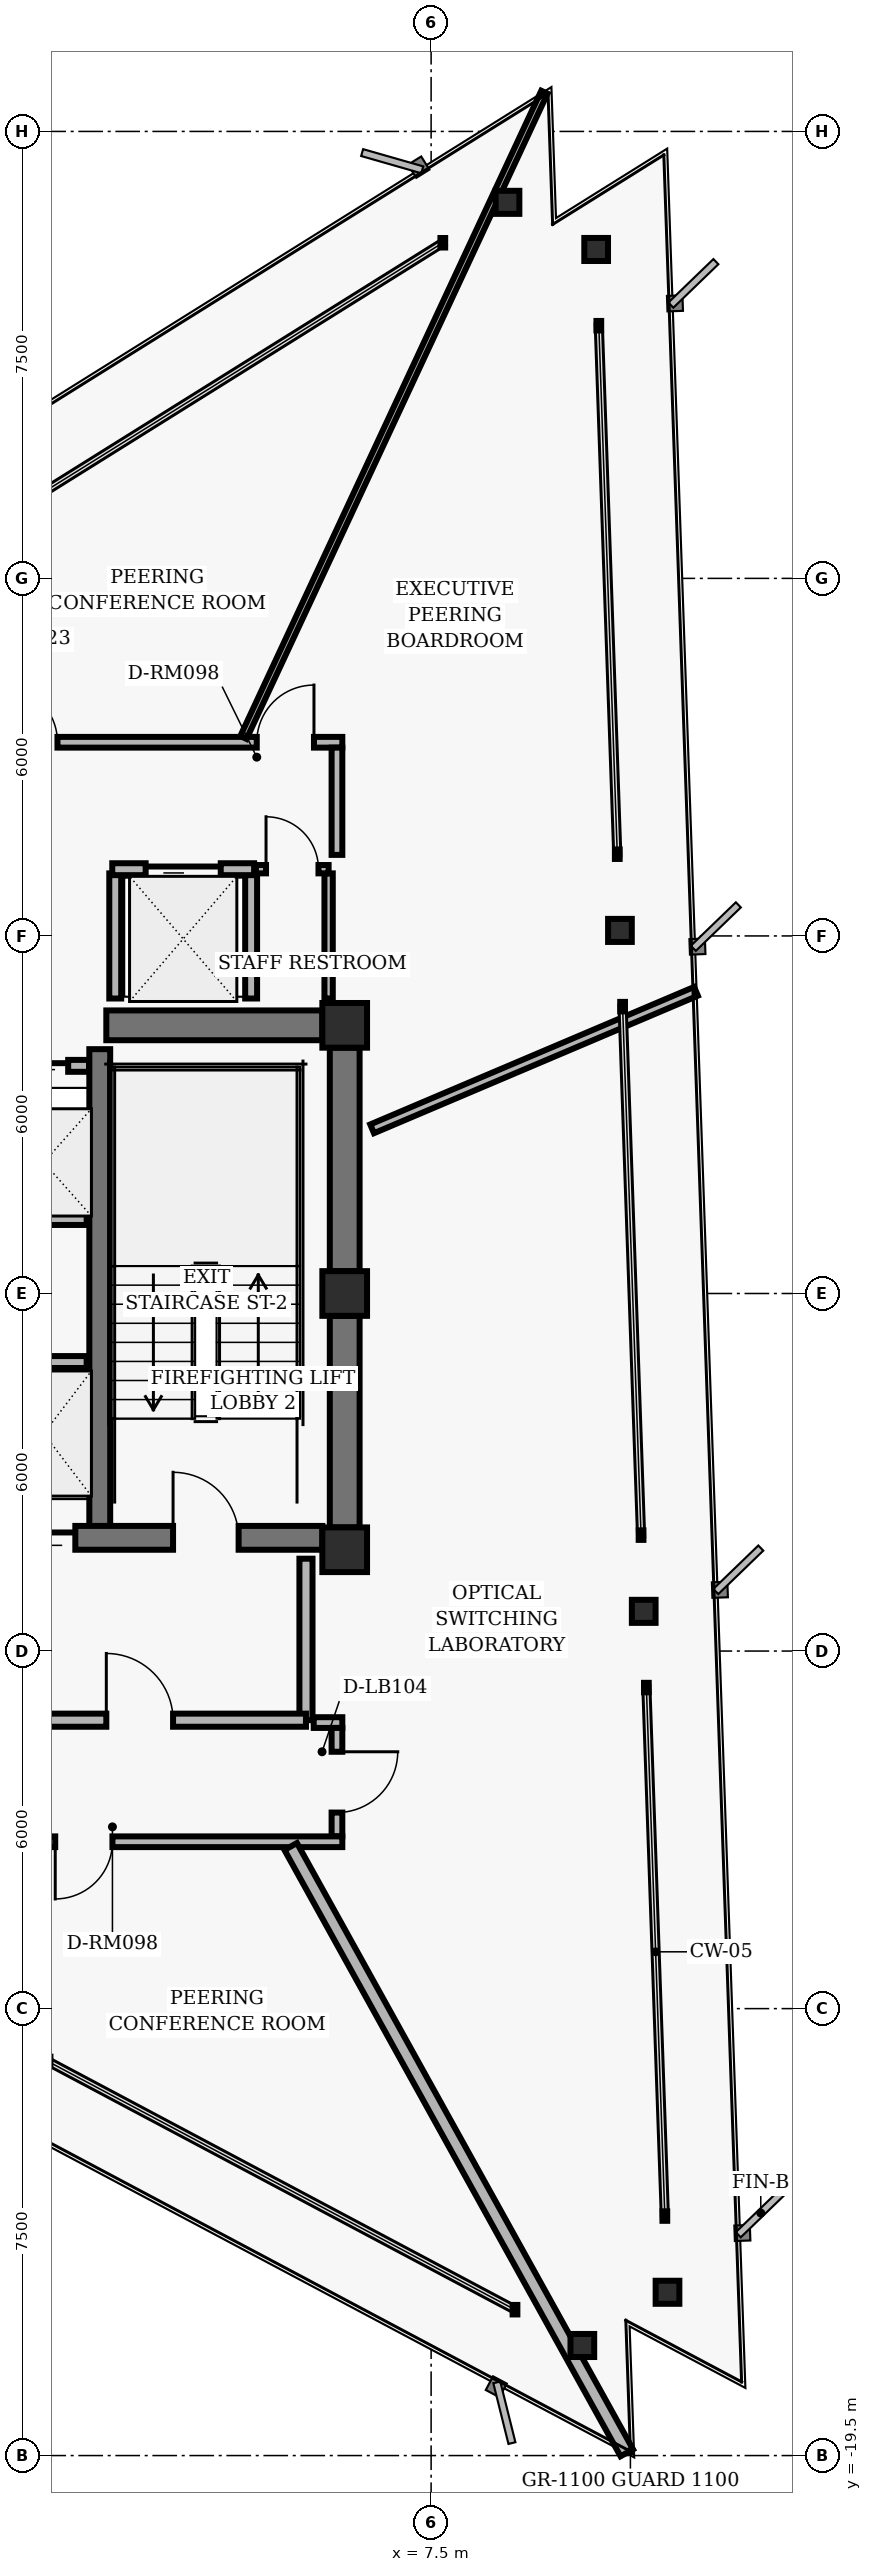
"""IFC4 building model, lengths in metres.
Left out: names, types, materials, properties, quantities, classifications, styles, units other than length and angle.
Written with IfcOpenShell. Run it as: python <this file> out.ifc"""

import sys

from ifc_helpers import new_model, si_unit, direction, frame, frame_2d, origin, origin_2d, place, context, subcontext, project, spatial, rectangle, hollow_rectangle, i_section, extrude, element, fill, save


model = new_model("IFC4")
c1 = context("Model", 3, precision=1e-05, world=origin(), true_north=direction((0.0, 1.0)))
c2 = subcontext(c1, "Body", "Model", "MODEL_VIEW")
j1 = project(units=[si_unit("LENGTHUNIT", "METRE"), si_unit("PLANEANGLEUNIT", "RADIAN")], contexts=[c1])
p1 = place(None, origin())
s1 = spatial("IfcSite", under=j1, at=p1, CompositionType="ELEMENT")
p2 = place(p1, origin())
s2 = spatial("IfcBuilding", under=s1, at=p2, CompositionType="ELEMENT")
p3 = place(p2, frame((0.0, 0.0, 193.6)))
s3 = spatial("IfcBuildingStorey", under=s2, at=p3, CompositionType="ELEMENT", Elevation=193.6)
for number, where, z_axis, x_axis in (
    (1, (6.05, 4.5, 0.0), (0.0, 0.0, 1.0), (1.0, 0.0, 0.0)),
    (2, (6.05, 0.0, 0.0), (0.0, 0.0, 1.0), (1.0, 0.0, 0.0)),
    (3, (6.05, -4.3, 0.0), (0.0, 0.0, 1.0), (1.0, 0.0, 0.0)),
):
    element("IfcColumn", number, at=place(p3, frame(where, z_axis=z_axis, x_axis=x_axis)), inside=s3, PredefinedType="COLUMN", context=c2, shape_type="SweptSolid", body=[
        extrude(hollow_rectangle(XDim=0.75, YDim=0.75, WallThickness=0.05, InnerFilletRadius=0.02, OuterFilletRadius=0.04, at=origin_2d()), origin(), (0.0, 0.0, 1.0), 3.04),
    ])
p4 = place(p3, frame((6.05, 0.375, 0.0), z_axis=(0.0, 0.0, 1.0), x_axis=(0.0, 1.0, 0.0)))
e4 = element("IfcWall", 4, at=p4, inside=s3, PredefinedType="SHEAR", context=c2, shape_type="SweptSolid", body=[
    extrude(rectangle(XDim=3.75, YDim=0.5, at=frame_2d((1.875, 0.0))), origin(), (0.0, 0.0, 1.0), 2.798),
])
p5 = place(p3, frame((6.05, -3.925, 0.0), z_axis=(0.0, 0.0, 1.0), x_axis=(0.0, 1.0, 0.0)))
e5 = element("IfcWall", 5, at=p5, inside=s3, PredefinedType="SHEAR", context=c2, shape_type="SweptSolid", body=[
    extrude(rectangle(XDim=3.55, YDim=0.5, at=frame_2d((1.775, 0.0))), origin(), (0.0, 0.0, 1.0), 2.798),
])
p6 = place(p3, frame((1.94, -4.1, 0.0), z_axis=(0.0, 0.0, 1.0), x_axis=(0.0, 1.0, 0.0)))
e6 = element("IfcWall", 6, at=p6, inside=s3, PredefinedType="SHEAR", context=c2, shape_type="SweptSolid", body=[
    extrude(rectangle(XDim=8.2, YDim=0.35, at=frame_2d((4.1, 0.0))), origin(), (0.0, 0.0, 1.0), 2.798),
])
p7 = place(p3, frame((-5.675, -4.1, 0.0), z_axis=(0.0, 0.0, 1.0), x_axis=(1.0, 0.0, 0.0)))
e7 = element("IfcWall", 7, at=p7, inside=s3, PredefinedType="SHEAR", context=c2, shape_type="SweptSolid", body=[
    extrude(rectangle(XDim=11.35, YDim=0.4, at=frame_2d((5.675, 0.0))), origin(), (0.0, 0.0, 1.0), 2.798),
])
p8 = place(p7, frame((1.405, 0.0, 0.0)))
e8 = element("IfcOpeningElement", 8, at=p8, cuts=e7, PredefinedType="OPENING", context=c2, shape_type="SweptSolid", body=[
    extrude(rectangle(XDim=1.1, YDim=2.04, at=frame_2d((0.55, 1.02))), frame((0.0, 0.21, 0.0), z_axis=(0.0, -1.0, 0.0), x_axis=(1.0, 0.0, 0.0)), (0.0, 0.0, 1.0), 0.42),
])
p9 = place(p7, frame((8.845, 0.0, 0.0)))
e9 = element("IfcOpeningElement", 9, at=p9, cuts=e7, PredefinedType="OPENING", context=c2, shape_type="SweptSolid", body=[
    extrude(rectangle(XDim=1.1, YDim=2.04, at=frame_2d((0.55, 1.02))), frame((0.0, 0.21, 0.0), z_axis=(0.0, -1.0, 0.0), x_axis=(1.0, 0.0, 0.0)), (0.0, 0.0, 1.0), 0.42),
])
p10 = place(p7, frame((4.145, 0.0, 0.0)))
e10 = element("IfcOpeningElement", 10, at=p10, cuts=e7, PredefinedType="OPENING", context=c2, shape_type="SweptSolid", body=[
    extrude(rectangle(XDim=1.06, YDim=2.04, at=frame_2d((0.53, 1.02))), frame((0.0, 0.21, 0.0), z_axis=(0.0, -1.0, 0.0), x_axis=(1.0, 0.0, 0.0)), (0.0, 0.0, 1.0), 0.42),
])
p11 = place(p7, frame((6.145, 0.0, 0.0)))
e11 = element("IfcOpeningElement", 11, at=p11, cuts=e7, PredefinedType="OPENING", context=c2, shape_type="SweptSolid", body=[
    extrude(rectangle(XDim=1.06, YDim=2.04, at=frame_2d((0.53, 1.02))), frame((0.0, 0.21, 0.0), z_axis=(0.0, -1.0, 0.0), x_axis=(1.0, 0.0, 0.0)), (0.0, 0.0, 1.0), 0.42),
])
p12 = place(p3, frame((2.05, 4.5, 0.0), z_axis=(0.0, 0.0, 1.0), x_axis=(1.0, 0.0, 0.0)))
e12 = element("IfcWall", 12, at=p12, inside=s3, PredefinedType="SHEAR", context=c2, shape_type="SweptSolid", body=[
    extrude(rectangle(XDim=3.625, YDim=0.5, at=frame_2d((1.812, 0.0))), origin(), (0.0, 0.0, 1.0), 2.798),
])
for number, where, z_axis, x_axis in (
    (13, (11.466, -16.76, 0.0), (0.0, 0.0, 1.0), (1.0, 0.0, 0.0)),
    (14, (11.067, -5.334, 0.0), (0.0, 0.0, 1.0), (1.0, 0.0, 0.0)),
    (15, (10.668, 6.093, 0.0), (0.0, 0.0, 1.0), (1.0, 0.0, 0.0)),
    (16, (10.269, 17.519, 0.0), (0.0, 0.0, 1.0), (1.0, 0.0, 0.0)),
    (17, (8.781, 18.31, 0.0), (0.0, 0.0, 1.0), (1.0, 0.0, 0.0)),
    (18, (10.037, -17.653, 0.0), (0.0, 0.0, 1.0), (1.0, 0.0, 0.0)),
):
    element("IfcColumn", number, at=place(p3, frame(where, z_axis=z_axis, x_axis=x_axis)), inside=s3, PredefinedType="COLUMN", context=c2, shape_type="SweptSolid", body=[
        extrude(i_section(OverallWidth=0.398, OverallDepth=0.387, WebThickness=0.021, FlangeThickness=0.033, FilletRadius=0.018, at=origin_2d()), origin(), (0.0, 0.0, 1.0), 3.04),
    ])
p13 = place(p3, frame((-1.72, -1.15, 0.0), z_axis=(0.0, 0.0, 1.0), x_axis=(1.0, 0.0, 0.0)))
e19 = element("IfcWall", 19, at=p13, inside=s3, PredefinedType="PARTITIONING", context=c2, shape_type="SweptSolid", body=[
    extrude(rectangle(XDim=3.44, YDim=0.2, at=frame_2d((1.72, 0.0))), origin(), (0.0, 0.0, 1.0), 2.773),
])
p14 = place(p3, frame((5.4, -7.16, 0.0), z_axis=(0.0, 0.0, 1.0), x_axis=(0.0, 1.0, 0.0)))
e20 = element("IfcWall", 20, at=p14, inside=s3, PredefinedType="PARTITIONING", context=c2, shape_type="SweptSolid", body=[
    extrude(rectangle(XDim=2.71, YDim=0.22, at=frame_2d((1.355, 0.0))), origin(), (0.0, 0.0, 1.0), 2.773),
])
p15 = place(p3, frame((0.0, -7.16, 0.0), z_axis=(0.0, 0.0, 1.0), x_axis=(1.0, 0.0, 0.0)))
e21 = element("IfcWall", 21, at=p15, inside=s3, PredefinedType="PARTITIONING", context=c2, shape_type="SweptSolid", body=[
    extrude(rectangle(XDim=5.4, YDim=0.22, at=frame_2d((2.7, 0.0))), origin(), (0.0, 0.0, 1.0), 2.773),
])
p16 = place(p15, frame((2.05, 0.0, 0.0)))
e22 = element("IfcOpeningElement", 22, at=p16, cuts=e21, PredefinedType="OPENING", context=c2, shape_type="SweptSolid", body=[
    extrude(rectangle(XDim=1.12, YDim=2.02, at=frame_2d((0.56, 1.01))), frame((0.0, 0.12, 0.0), z_axis=(0.0, -1.0, 0.0), x_axis=(1.0, 0.0, 0.0)), (0.0, 0.0, 1.0), 0.24),
])
p17 = place(p3, frame((-1.72, 1.25, 0.0), z_axis=(0.0, 0.0, 1.0), x_axis=(1.0, 0.0, 0.0)))
e23 = element("IfcWall", 23, at=p17, inside=s3, PredefinedType="PARTITIONING", context=c2, shape_type="SweptSolid", body=[
    extrude(rectangle(XDim=3.44, YDim=0.2, at=frame_2d((1.72, 0.0))), origin(), (0.0, 0.0, 1.0), 2.773),
])
p18 = place(p3, frame((-1.76, 3.82, 0.0), z_axis=(0.0, 0.0, 1.0), x_axis=(1.0, 0.0, 0.0)))
e24 = element("IfcWall", 24, at=p18, inside=s3, PredefinedType="PARTITIONING", context=c2, shape_type="SweptSolid", body=[
    extrude(rectangle(XDim=3.52, YDim=0.2, at=frame_2d((1.76, 0.0))), origin(), (0.0, 0.0, 1.0), 2.773),
])
p19 = place(p18, frame((0.35, 0.0, 0.0)))
e25 = element("IfcOpeningElement", 25, at=p19, cuts=e24, PredefinedType="OPENING", context=c2, shape_type="SweptSolid", body=[
    extrude(rectangle(XDim=1.06, YDim=2.04, at=frame_2d((0.53, 1.02))), frame((0.0, 0.11, 0.0), z_axis=(0.0, -1.0, 0.0), x_axis=(1.0, 0.0, 0.0)), (0.0, 0.0, 1.0), 0.22),
])
p20 = place(p18, frame((2.11, 0.0, 0.0)))
e26 = element("IfcOpeningElement", 26, at=p20, cuts=e24, PredefinedType="OPENING", context=c2, shape_type="SweptSolid", body=[
    extrude(rectangle(XDim=1.06, YDim=2.04, at=frame_2d((0.53, 1.02))), frame((0.0, 0.11, 0.0), z_axis=(0.0, -1.0, 0.0), x_axis=(1.0, 0.0, 0.0)), (0.0, 0.0, 1.0), 0.22),
])
for number, where, z_axis, x_axis in (
    (27, (2.2, 4.95, 0.0), (0.0, 0.0, 1.0), (0.0, 1.0, 0.0)),
    (28, (4.48, 4.95, 0.0), (0.0, 0.0, 1.0), (0.0, 1.0, 0.0)),
):
    element("IfcWall", number, at=place(p3, frame(where, z_axis=z_axis, x_axis=x_axis)), inside=s3, PredefinedType="PARTITIONING", context=c2, shape_type="SweptSolid", body=[
        extrude(rectangle(XDim=2.1, YDim=0.2, at=frame_2d((1.05, 0.0))), origin(), (0.0, 0.0, 1.0), 2.773),
    ])
p21 = place(p3, frame((2.15, 7.12, 0.0), z_axis=(0.0, 0.0, 1.0), x_axis=(1.0, 0.0, 0.0)))
e29 = element("IfcWall", 29, at=p21, inside=s3, PredefinedType="PARTITIONING", context=c2, shape_type="SweptSolid", body=[
    extrude(rectangle(XDim=2.38, YDim=0.2, at=frame_2d((1.19, 0.0))), origin(), (0.0, 0.0, 1.0), 2.773),
])
p22 = place(p21, frame((0.56, 0.0, 0.0)))
e30 = element("IfcOpeningElement", 30, at=p22, cuts=e29, PredefinedType="OPENING", context=c2, shape_type="SweptSolid", body=[
    extrude(rectangle(XDim=1.26, YDim=2.06, at=frame_2d((0.63, 1.03))), frame((0.0, 0.11, 0.0), z_axis=(0.0, -1.0, 0.0), x_axis=(1.0, 0.0, 0.0)), (0.0, 0.0, 1.0), 0.22),
])
p23 = place(p3, frame((5.78, 4.95, 0.0), z_axis=(0.0, 0.0, 1.0), x_axis=(0.0, 1.0, 0.0)))
e31 = element("IfcWall", 31, at=p23, inside=s3, PredefinedType="PARTITIONING", context=c2, shape_type="SweptSolid", body=[
    extrude(rectangle(XDim=2.1, YDim=0.14, at=frame_2d((1.05, 0.0))), origin(), (0.0, 0.0, 1.0), 2.253),
])
p24 = place(p3, frame((4.56, 7.12, 0.0), z_axis=(0.0, 0.0, 1.0), x_axis=(1.0, 0.0, 0.0)))
e32 = element("IfcWall", 32, at=p24, inside=s3, PredefinedType="PARTITIONING", context=c2, shape_type="SweptSolid", body=[
    extrude(rectangle(XDim=1.22, YDim=0.14, at=frame_2d((0.61, 0.0))), origin(), (0.0, 0.0, 1.0), 2.773),
])
p25 = place(p24, frame((0.17, 0.0, 0.0)))
e33 = element("IfcOpeningElement", 33, at=p25, cuts=e32, PredefinedType="OPENING", context=c2, shape_type="SweptSolid", body=[
    extrude(rectangle(XDim=0.88, YDim=2.02, at=frame_2d((0.44, 1.01))), frame((0.0, 0.08, 0.0), z_axis=(0.0, -1.0, 0.0), x_axis=(1.0, 0.0, 0.0)), (0.0, 0.0, 1.0), 0.16),
])
p26 = place(p3, frame((-7.29, 9.25, 0.0), z_axis=(0.0, 0.0, 1.0), x_axis=(1.0, 0.0, 0.0)))
e34 = element("IfcWall", 34, at=p26, inside=s3, PredefinedType="PARTITIONING", context=c2, shape_type="SweptSolid", body=[
    extrude(rectangle(XDim=13.3, YDim=0.18, at=frame_2d((6.65, 0.0))), origin(), (0.0, 0.0, 1.0), 2.773),
])
p27 = place(p26, frame((11.864, 0.0, 0.0)))
e35 = element("IfcOpeningElement", 35, at=p27, cuts=e34, PredefinedType="OPENING", context=c2, shape_type="SweptSolid", body=[
    extrude(rectangle(XDim=0.96, YDim=2.02, at=frame_2d((0.48, 1.01))), frame((0.0, 0.1, 0.0), z_axis=(0.0, -1.0, 0.0), x_axis=(1.0, 0.0, 0.0)), (0.0, 0.0, 1.0), 0.2),
])
p28 = place(p26, frame((7.561, 0.0, 0.0)))
e36 = element("IfcOpeningElement", 36, at=p28, cuts=e34, PredefinedType="OPENING", context=c2, shape_type="SweptSolid", body=[
    extrude(rectangle(XDim=0.96, YDim=2.02, at=frame_2d((0.48, 1.01))), frame((0.0, 0.1, 0.0), z_axis=(0.0, -1.0, 0.0), x_axis=(1.0, 0.0, 0.0)), (0.0, 0.0, 1.0), 0.2),
])
p29 = place(p26, frame((1.867, 0.0, 0.0)))
e37 = element("IfcOpeningElement", 37, at=p29, cuts=e34, PredefinedType="OPENING", context=c2, shape_type="SweptSolid", body=[
    extrude(rectangle(XDim=0.96, YDim=2.02, at=frame_2d((0.48, 1.01))), frame((0.0, 0.1, 0.0), z_axis=(0.0, -1.0, 0.0), x_axis=(1.0, 0.0, 0.0)), (0.0, 0.0, 1.0), 0.2),
])
p30 = place(p3, frame((5.92, 9.16, 0.0), z_axis=(0.0, 0.0, 1.0), x_axis=(0.0, -1.0, 0.0)))
e38 = element("IfcWall", 38, at=p30, inside=s3, PredefinedType="PARTITIONING", context=c2, shape_type="SweptSolid", body=[
    extrude(rectangle(XDim=1.8, YDim=0.18, at=frame_2d((0.9, 0.0))), origin(), (0.0, 0.0, 1.0), 2.773),
])
p31 = place(p3, frame((5.53, -7.2, 0.0), z_axis=(0.0, 0.0, 1.0), x_axis=(1.0, 0.0, 0.0)))
e39 = element("IfcWall", 39, at=p31, inside=s3, PredefinedType="PARTITIONING", context=c2, shape_type="SweptSolid", body=[
    extrude(rectangle(XDim=0.48, YDim=0.18, at=frame_2d((0.24, 0.0))), origin(), (0.0, 0.0, 1.0), 2.773),
])
p32 = place(p3, frame((5.92, -7.29, 0.0), z_axis=(0.0, 0.0, 1.0), x_axis=(0.0, -1.0, 0.0)))
e40 = element("IfcWall", 40, at=p32, inside=s3, PredefinedType="PARTITIONING", context=c2, shape_type="SweptSolid", body=[
    extrude(rectangle(XDim=1.82, YDim=0.18, at=frame_2d((0.91, 0.0))), origin(), (0.0, 0.0, 1.0), 2.773),
])
p33 = place(p32, frame((0.4, 0.0, 0.0)))
e41 = element("IfcOpeningElement", 41, at=p33, cuts=e40, PredefinedType="OPENING", context=c2, shape_type="SweptSolid", body=[
    extrude(rectangle(XDim=1.02, YDim=2.02, at=frame_2d((0.51, 1.01))), frame((0.0, 0.1, 0.0), z_axis=(0.0, -1.0, 0.0), x_axis=(1.0, 0.0, 0.0)), (0.0, 0.0, 1.0), 0.2),
])
p34 = place(p3, frame((6.01, -9.2, 0.0), z_axis=(0.0, 0.0, 1.0), x_axis=(-1.0, 0.0, 0.0)))
e42 = element("IfcWall", 42, at=p34, inside=s3, PredefinedType="PARTITIONING", context=c2, shape_type="SweptSolid", body=[
    extrude(rectangle(XDim=13.3, YDim=0.18, at=frame_2d((6.65, 0.0))), origin(), (0.0, 0.0, 1.0), 2.395),
])
p35 = place(p34, frame((9.948, 0.0, 0.0)))
e43 = element("IfcOpeningElement", 43, at=p35, cuts=e42, PredefinedType="OPENING", context=c2, shape_type="SweptSolid", body=[
    extrude(rectangle(XDim=0.96, YDim=2.02, at=frame_2d((0.48, 1.01))), frame((0.0, 0.1, 0.0), z_axis=(0.0, -1.0, 0.0), x_axis=(1.0, 0.0, 0.0)), (0.0, 0.0, 1.0), 0.2),
])
p36 = place(p34, frame((3.857, 0.0, 0.0)))
e44 = element("IfcOpeningElement", 44, at=p36, cuts=e42, PredefinedType="OPENING", context=c2, shape_type="SweptSolid", body=[
    extrude(rectangle(XDim=0.96, YDim=2.02, at=frame_2d((0.48, 1.01))), frame((0.0, 0.1, 0.0), z_axis=(0.0, -1.0, 0.0), x_axis=(1.0, 0.0, 0.0)), (0.0, 0.0, 1.0), 0.2),
])
p37 = place(p3, frame((5.144, -9.28, 0.0), z_axis=(0.0, 0.0, 1.0), x_axis=(0.484798043034, -0.874626124393, 0.0)))
e45 = element("IfcWall", 45, at=p37, inside=s3, PredefinedType="PARTITIONING", context=c2, shape_type="SweptSolid", body=[
    extrude(rectangle(XDim=11.633, YDim=0.24, at=frame_2d((5.816, 0.0))), origin(), (0.0, 0.0, 1.0), 2.253),
])
p38 = place(p3, frame((6.51, 2.763, 0.0), z_axis=(0.0, 0.0, 1.0), x_axis=(0.920487144923, 0.390772844543, 0.0)))
e46 = element("IfcWall", 46, at=p38, inside=s3, PredefinedType="PARTITIONING", context=c2, shape_type="SweptSolid", body=[
    extrude(rectangle(XDim=5.904, YDim=0.16, at=frame_2d((2.952, 0.0))), origin(), (0.0, 0.0, 1.0), 2.773),
])
p39 = place(p3, frame((4.351, 9.33, 0.0), z_axis=(0.0, 0.0, 1.0), x_axis=(0.422616983209, 0.906308383225, 0.0)))
e47 = element("IfcWall", 47, at=p39, inside=s3, PredefinedType="MOVABLE", context=c2, shape_type="SweptSolid", body=[
    extrude(rectangle(XDim=11.948, YDim=0.115, at=frame_2d((5.974, 0.0))), origin(), (0.0, 0.0, 1.0), 2.253),
])
p40 = place(p9, origin())
e48 = element("IfcDoor", 48, at=p40, inside=s3, OperationType="SINGLE_SWING_LEFT", PredefinedType="DOOR", context=c2, shape_type="SweptSolid", body=[
    extrude(rectangle(XDim=1.1, YDim=2.04, at=frame_2d((0.55, 1.02))), frame((0.0, 0.025, 0.0), z_axis=(0.0, -1.0, 0.0), x_axis=(1.0, 0.0, 0.0)), (0.0, 0.0, 1.0), 0.05),
])
fill(e9, e48)
p41 = place(p11, origin())
e49 = element("IfcDoor", 49, at=p41, inside=s3, OperationType="SLIDING_TO_RIGHT", PredefinedType="DOOR", context=c2, shape_type="SweptSolid", body=[
    extrude(rectangle(XDim=1.06, YDim=2.04, at=frame_2d((0.53, 1.02))), frame((0.0, 0.025, 0.0), z_axis=(0.0, -1.0, 0.0), x_axis=(1.0, 0.0, 0.0)), (0.0, 0.0, 1.0), 0.05),
])
fill(e11, e49)
p42 = place(p16, origin())
e50 = element("IfcDoor", 50, at=p42, inside=s3, OperationType="SINGLE_SWING_LEFT", PredefinedType="DOOR", context=c2, shape_type="SweptSolid", body=[
    extrude(rectangle(XDim=1.12, YDim=2.02, at=frame_2d((0.56, 1.01))), frame((0.0, 0.025, 0.0), z_axis=(0.0, -1.0, 0.0), x_axis=(1.0, 0.0, 0.0)), (0.0, 0.0, 1.0), 0.05),
])
fill(e22, e50)
p43 = place(p20, origin())
e51 = element("IfcDoor", 51, at=p43, inside=s3, OperationType="SLIDING_TO_RIGHT", PredefinedType="DOOR", context=c2, shape_type="SweptSolid", body=[
    extrude(rectangle(XDim=1.06, YDim=2.04, at=frame_2d((0.53, 1.02))), frame((0.0, 0.025, 0.0), z_axis=(0.0, -1.0, 0.0), x_axis=(1.0, 0.0, 0.0)), (0.0, 0.0, 1.0), 0.05),
])
fill(e26, e51)
p44 = place(p22, origin())
e52 = element("IfcDoor", 52, at=p44, inside=s3, OperationType="SLIDING_TO_LEFT", PredefinedType="DOOR", context=c2, shape_type="SweptSolid", body=[
    extrude(rectangle(XDim=1.26, YDim=2.06, at=frame_2d((0.63, 1.03))), frame((0.0, 0.025, 0.0), z_axis=(0.0, -1.0, 0.0), x_axis=(1.0, 0.0, 0.0)), (0.0, 0.0, 1.0), 0.05),
])
fill(e30, e52)
p45 = place(p25, origin())
e53 = element("IfcDoor", 53, at=p45, inside=s3, OperationType="SINGLE_SWING_LEFT", PredefinedType="DOOR", context=c2, shape_type="SweptSolid", body=[
    extrude(rectangle(XDim=0.88, YDim=2.02, at=frame_2d((0.44, 1.01))), frame((0.0, 0.025, 0.0), z_axis=(0.0, -1.0, 0.0), x_axis=(1.0, 0.0, 0.0)), (0.0, 0.0, 1.0), 0.05),
])
fill(e33, e53)
p46 = place(p36, origin())
e54 = element("IfcDoor", 54, at=p46, inside=s3, OperationType="SINGLE_SWING_RIGHT", PredefinedType="DOOR", context=c2, shape_type="SweptSolid", body=[
    extrude(rectangle(XDim=0.96, YDim=2.02, at=frame_2d((0.48, 1.01))), frame((0.0, 0.025, 0.0), z_axis=(0.0, -1.0, 0.0), x_axis=(1.0, 0.0, 0.0)), (0.0, 0.0, 1.0), 0.05),
])
fill(e44, e54)
p47 = place(p33, origin())
e55 = element("IfcDoor", 55, at=p47, inside=s3, OperationType="SINGLE_SWING_LEFT", PredefinedType="DOOR", context=c2, shape_type="SweptSolid", body=[
    extrude(rectangle(XDim=1.02, YDim=2.02, at=frame_2d((0.51, 1.01))), frame((0.0, 0.025, 0.0), z_axis=(0.0, -1.0, 0.0), x_axis=(1.0, 0.0, 0.0)), (0.0, 0.0, 1.0), 0.05),
])
fill(e41, e55)
p48 = place(p27, origin())
e56 = element("IfcDoor", 56, at=p48, inside=s3, OperationType="SINGLE_SWING_RIGHT", PredefinedType="DOOR", context=c2, shape_type="SweptSolid", body=[
    extrude(rectangle(XDim=0.96, YDim=2.02, at=frame_2d((0.48, 1.01))), frame((0.0, 0.025, 0.0), z_axis=(0.0, -1.0, 0.0), x_axis=(1.0, 0.0, 0.0)), (0.0, 0.0, 1.0), 0.05),
])
fill(e35, e56)
p49 = place(p28, origin())
e57 = element("IfcDoor", 57, at=p49, inside=s3, OperationType="SINGLE_SWING_LEFT", PredefinedType="DOOR", context=c2, shape_type="SweptSolid", body=[
    extrude(rectangle(XDim=0.96, YDim=2.02, at=frame_2d((0.48, 1.01))), frame((0.0, 0.025, 0.0), z_axis=(0.0, -1.0, 0.0), x_axis=(1.0, 0.0, 0.0)), (0.0, 0.0, 1.0), 0.05),
])
fill(e36, e57)
save(model, sys.argv[1])
